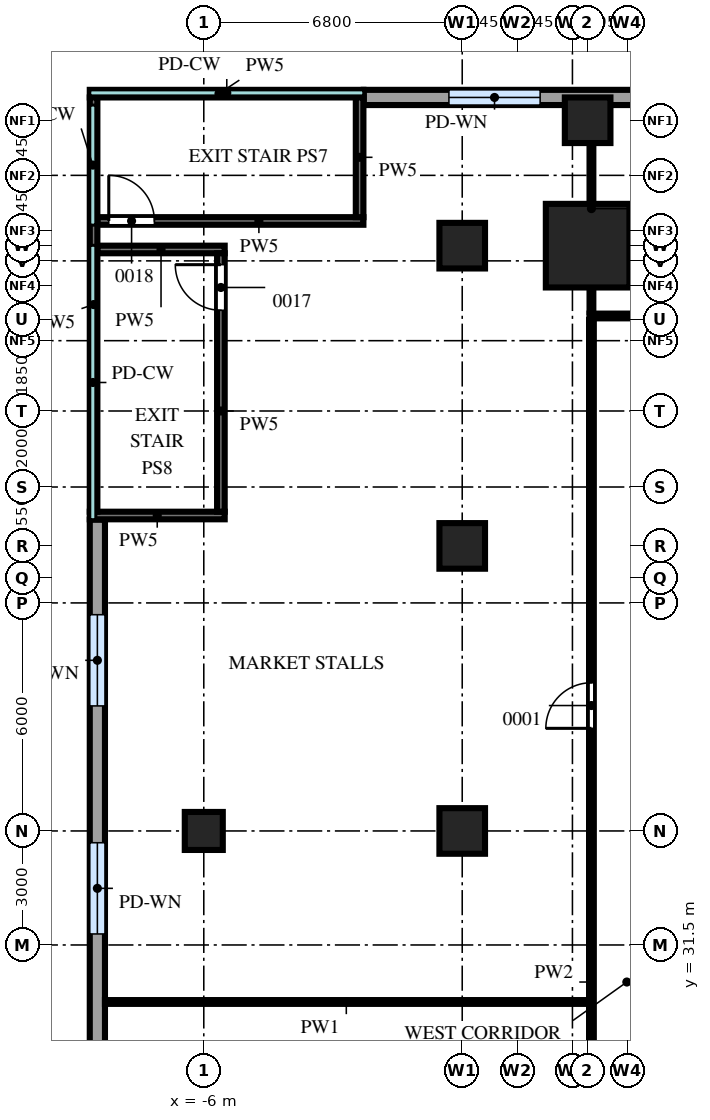
"""IFC4 building model, lengths in metres.
Left out: names, types, materials, properties, quantities, classifications, styles, units other than length and angle.
Written with IfcOpenShell. Run it as: python <this file> out.ifc"""

import sys

from ifc_helpers import new_model, si_unit, direction, frame, frame_2d, origin, origin_2d, place, context, subcontext, project, spatial, rectangle, extrude, source, transform, mapped, element, fill, save


model = new_model("IFC4")
c1 = context("Model", 3, precision=1e-05, world=origin(), true_north=direction((0.0, 1.0)))
c2 = subcontext(c1, "Body", "Model", "MODEL_VIEW")
j1 = project(units=[si_unit("LENGTHUNIT", "METRE"), si_unit("PLANEANGLEUNIT", "RADIAN")], contexts=[c1])
p1 = place(None, origin())
s1 = spatial("IfcSite", under=j1, at=p1, CompositionType="ELEMENT")
p2 = place(p1, origin())
s2 = spatial("IfcBuilding", under=s1, at=p2, CompositionType="ELEMENT")
p3 = place(p2, frame((0.0, 0.0, 7.5)))
s3 = spatial("IfcBuildingStorey", under=s2, at=p3, CompositionType="ELEMENT", Elevation=7.5)
m1 = source(origin(), c2, "Body", "SweptSolid", [
    extrude(rectangle(XDim=2.2, YDim=2.2, at=origin_2d()), origin(), (0.0, 0.0, 1.0), 5.2),
])
p4 = place(p3, frame((4.1, 49.9, 0.0), z_axis=(0.0, 0.0, 1.0), x_axis=(1.0, 0.0, 0.0)))
e1 = element("IfcColumn", 1, at=p4, inside=s3, PredefinedType="COLUMN", context=c2, shape_type="MappedRepresentation", body=[
    mapped(m1, transform((0.0, 0.0, 0.0))),
])
m2 = source(origin(), c2, "Body", "SweptSolid", [
    extrude(rectangle(XDim=1.2, YDim=1.2, at=origin_2d()), origin(), (0.0, 0.0, 1.0), 5.2),
])
for number, where, z_axis, x_axis in (
    (2, (4.1, 53.2, 0.0), (0.0, 0.0, 1.0), (1.0, 0.0, 0.0)),
    (3, (0.8, 34.5, 0.0), (0.0, 0.0, 1.0), (1.0, 0.0, 0.0)),
    (4, (0.8, 42.0, 0.0), (0.0, 0.0, 1.0), (1.0, 0.0, 0.0)),
    (5, (0.8, 49.9, 0.0), (0.0, 0.0, 1.0), (1.0, 0.0, 0.0)),
):
    element("IfcColumn", number, at=place(p3, frame(where, z_axis=z_axis, x_axis=x_axis)), inside=s3, PredefinedType="COLUMN", context=c2, shape_type="MappedRepresentation", body=[
        mapped(m2, transform((0.0, 0.0, 0.0))),
    ])
m3 = source(origin(), c2, "Body", "SweptSolid", [
    extrude(rectangle(XDim=1.0, YDim=1.0, at=origin_2d()), origin(), (0.0, 0.0, 1.0), 5.2),
])
p5 = place(p3, frame((-6.0, 34.5, 0.0), z_axis=(0.0, 0.0, 1.0), x_axis=(1.0, 0.0, 0.0)))
e6 = element("IfcColumn", 6, at=p5, inside=s3, PredefinedType="COLUMN", context=c2, shape_type="MappedRepresentation", body=[
    mapped(m3, transform((0.0, 0.0, 0.0))),
])
m4 = source(origin(), c2, "Body", "SweptSolid", [
    extrude(rectangle(XDim=31.38, YDim=0.4, at=frame_2d((15.69, 0.0))), origin(), (0.0, 0.0, 1.0), 5.2),
])
p6 = place(p3, frame((-8.8, 42.69, 0.0), z_axis=(0.0, 0.0, 1.0), x_axis=(0.0, -1.0, 0.0)))
e7 = element("IfcWall", 7, at=p6, inside=s3, PredefinedType="SOLIDWALL", context=c2, shape_type="MappedRepresentation", body=[
    mapped(m4, transform((0.0, 0.0, 0.0))),
])
m5 = source(origin(), c2, "Body", "SweptSolid", [
    extrude(rectangle(XDim=2.4, YDim=2.4, at=frame_2d((1.2, 1.2))), frame((0.0, 0.21, 0.0), z_axis=(0.0, -1.0, 0.0), x_axis=(1.0, 0.0, 0.0)), (0.0, 0.0, 1.0), 0.42),
])
p7 = place(p6, frame((2.5, 0.0, 1.0)))
e8 = element("IfcOpeningElement", 8, at=p7, cuts=e7, PredefinedType="OPENING", context=c2, shape_type="MappedRepresentation", body=[
    mapped(m5, transform((0.0, 0.0, 0.0))),
])
p8 = place(p6, frame((8.5, 0.0, 1.0)))
e9 = element("IfcOpeningElement", 9, at=p8, cuts=e7, PredefinedType="OPENING", context=c2, shape_type="MappedRepresentation", body=[
    mapped(m5, transform((0.0, 0.0, 0.0))),
])
p9 = place(p6, frame((14.5, 0.0, 1.0)))
e10 = element("IfcOpeningElement", 10, at=p9, cuts=e7, PredefinedType="OPENING", context=c2, shape_type="MappedRepresentation", body=[
    mapped(m5, transform((0.0, 0.0, 0.0))),
])
p10 = place(p6, frame((20.5, 0.0, 1.0)))
e11 = element("IfcOpeningElement", 11, at=p10, cuts=e7, PredefinedType="OPENING", context=c2, shape_type="MappedRepresentation", body=[
    mapped(m5, transform((0.0, 0.0, 0.0))),
])
p11 = place(p6, frame((26.5, 0.0, 1.0)))
e12 = element("IfcOpeningElement", 12, at=p11, cuts=e7, PredefinedType="OPENING", context=c2, shape_type="MappedRepresentation", body=[
    mapped(m5, transform((0.0, 0.0, 0.0))),
])
m6 = source(origin(), c2, "Body", "SweptSolid", [
    extrude(rectangle(XDim=30.84, YDim=0.4, at=frame_2d((15.42, 0.0))), origin(), (0.0, 0.0, 1.0), 5.2),
])
p12 = place(p3, frame((29.05, 53.8, 0.0), z_axis=(0.0, 0.0, 1.0), x_axis=(-1.0, 0.0, 0.0)))
e13 = element("IfcWall", 13, at=p12, inside=s3, PredefinedType="SOLIDWALL", context=c2, shape_type="MappedRepresentation", body=[
    mapped(m6, transform((0.0, 0.0, 0.0))),
])
p13 = place(p12, frame((20.2, 0.0, 1.0)))
e14 = element("IfcOpeningElement", 14, at=p13, cuts=e13, PredefinedType="OPENING", context=c2, shape_type="MappedRepresentation", body=[
    mapped(m5, transform((0.0, 0.0, 0.0))),
])
p14 = place(p12, frame((26.2, 0.0, 1.0)))
e15 = element("IfcOpeningElement", 15, at=p14, cuts=e13, PredefinedType="OPENING", context=c2, shape_type="MappedRepresentation", body=[
    mapped(m5, transform((0.0, 0.0, 0.0))),
])
m7 = source(origin(), c2, "Body", "SweptSolid", [
    extrude(rectangle(XDim=7.0, YDim=0.2, at=frame_2d((3.5, 0.0))), origin(), (0.0, 0.0, 1.0), 5.2),
])
p15 = place(p3, frame((-8.8, 50.55, 0.0), z_axis=(0.0, 0.0, 1.0), x_axis=(1.0, 0.0, 0.0)))
e16 = element("IfcWall", 16, at=p15, inside=s3, PredefinedType="PARTITIONING", context=c2, shape_type="MappedRepresentation", body=[
    mapped(m7, transform((0.0, 0.0, 0.0))),
])
m8 = source(origin(), c2, "Body", "SweptSolid", [
    extrude(rectangle(XDim=1.2, YDim=2.1, at=frame_2d((0.6, 1.05))), frame((0.0, 0.11, 0.0), z_axis=(0.0, -1.0, 0.0), x_axis=(1.0, 0.0, 0.0)), (0.0, 0.0, 1.0), 0.22),
])
p16 = place(p15, frame((0.3, 0.0, 0.0)))
e17 = element("IfcOpeningElement", 17, at=p16, cuts=e16, PredefinedType="OPENING", context=c2, shape_type="MappedRepresentation", body=[
    mapped(m8, transform((0.0, 0.0, 0.0))),
])
m9 = source(origin(), c2, "Body", "SweptSolid", [
    extrude(rectangle(XDim=7.2, YDim=0.2, at=frame_2d((3.6, 0.0))), origin(), (0.0, 0.0, 1.0), 5.2),
])
p17 = place(p3, frame((-9.0, 53.9, 0.0), z_axis=(0.0, 0.0, 1.0), x_axis=(1.0, 0.0, 0.0)))
e18 = element("IfcWall", 18, at=p17, inside=s3, PredefinedType="PARTITIONING", context=c2, shape_type="MappedRepresentation", body=[
    mapped(m9, transform((0.0, 0.0, 0.0))),
])
m10 = source(origin(), c2, "Body", "SweptSolid", [
    extrude(rectangle(XDim=3.15, YDim=0.2, at=frame_2d((1.575, 0.0))), origin(), (0.0, 0.0, 1.0), 5.2),
])
p18 = place(p3, frame((-1.9, 50.65, 0.0), z_axis=(0.0, 0.0, 1.0), x_axis=(0.0, 1.0, 0.0)))
e19 = element("IfcWall", 19, at=p18, inside=s3, PredefinedType="PARTITIONING", context=c2, shape_type="MappedRepresentation", body=[
    mapped(m10, transform((0.0, 0.0, 0.0))),
])
m11 = source(origin(), c2, "Body", "SweptSolid", [
    extrude(rectangle(XDim=3.55, YDim=0.2, at=frame_2d((1.775, 0.0))), origin(), (0.0, 0.0, 1.0), 5.2),
])
p19 = place(p3, frame((-9.0, 42.8, 0.0), z_axis=(0.0, 0.0, 1.0), x_axis=(1.0, 0.0, 0.0)))
e20 = element("IfcWall", 20, at=p19, inside=s3, PredefinedType="PARTITIONING", context=c2, shape_type="MappedRepresentation", body=[
    mapped(m11, transform((0.0, 0.0, 0.0))),
])
m12 = source(origin(), c2, "Body", "SweptSolid", [
    extrude(rectangle(XDim=3.35, YDim=0.2, at=frame_2d((1.675, 0.0))), origin(), (0.0, 0.0, 1.0), 5.2),
])
p20 = place(p3, frame((-8.8, 49.8, 0.0), z_axis=(0.0, 0.0, 1.0), x_axis=(1.0, 0.0, 0.0)))
e21 = element("IfcWall", 21, at=p20, inside=s3, PredefinedType="PARTITIONING", context=c2, shape_type="MappedRepresentation", body=[
    mapped(m12, transform((0.0, 0.0, 0.0))),
])
m13 = source(origin(), c2, "Body", "SweptSolid", [
    extrude(rectangle(XDim=10.9, YDim=0.2, at=frame_2d((5.45, 0.0))), origin(), (0.0, 0.0, 1.0), 5.2),
])
p21 = place(p3, frame((-8.9, 42.9, 0.0), z_axis=(0.0, 0.0, 1.0), x_axis=(0.0, 1.0, 0.0)))
e22 = element("IfcWall", 22, at=p21, inside=s3, PredefinedType="PARTITIONING", context=c2, shape_type="MappedRepresentation", body=[
    mapped(m13, transform((0.0, 0.0, 0.0))),
])
m14 = source(origin(), c2, "Body", "SweptSolid", [
    extrude(rectangle(XDim=6.8, YDim=0.2, at=frame_2d((3.4, 0.0))), origin(), (0.0, 0.0, 1.0), 5.2),
])
p22 = place(p3, frame((-5.55, 42.9, 0.0), z_axis=(0.0, 0.0, 1.0), x_axis=(0.0, 1.0, 0.0)))
e23 = element("IfcWall", 23, at=p22, inside=s3, PredefinedType="PARTITIONING", context=c2, shape_type="MappedRepresentation", body=[
    mapped(m14, transform((0.0, 0.0, 0.0))),
])
p23 = place(p22, frame((5.3, 0.0, 0.0)))
e24 = element("IfcOpeningElement", 24, at=p23, cuts=e23, PredefinedType="OPENING", context=c2, shape_type="MappedRepresentation", body=[
    mapped(m8, transform((0.0, 0.0, 0.0))),
])
m15 = source(origin(), c2, "Body", "SweptSolid", [
    extrude(rectangle(XDim=41.8, YDim=0.125, at=frame_2d((20.9, 0.0))), origin(), (0.0, 0.0, 1.0), 5.2),
])
p24 = place(p3, frame((4.2, 6.15, 0.0), z_axis=(0.0, 0.0, 1.0), x_axis=(0.0, 1.0, 0.0)))
e25 = element("IfcWall", 25, at=p24, inside=s3, PredefinedType="PARTITIONING", context=c2, shape_type="MappedRepresentation", body=[
    mapped(m15, transform((0.0, 0.0, 0.0))),
])
m16 = source(origin(), c2, "Body", "SweptSolid", [
    extrude(rectangle(XDim=1.2, YDim=2.1, at=frame_2d((0.6, 1.05))), frame((0.0, 0.073, 0.0), z_axis=(0.0, -1.0, 0.0), x_axis=(1.0, 0.0, 0.0)), (0.0, 0.0, 1.0), 0.145),
])
p25 = place(p24, frame((5.65, 0.0, 0.0)))
e26 = element("IfcOpeningElement", 26, at=p25, cuts=e25, PredefinedType="OPENING", context=c2, shape_type="MappedRepresentation", body=[
    mapped(m16, transform((0.0, 0.0, 0.0))),
])
p26 = place(p24, frame((16.5, 0.0, 0.0)))
e27 = element("IfcOpeningElement", 27, at=p26, cuts=e25, PredefinedType="OPENING", context=c2, shape_type="MappedRepresentation", body=[
    mapped(m16, transform((0.0, 0.0, 0.0))),
])
p27 = place(p24, frame((31.05, 0.0, 0.0)))
e28 = element("IfcOpeningElement", 28, at=p27, cuts=e25, PredefinedType="OPENING", context=c2, shape_type="MappedRepresentation", body=[
    mapped(m16, transform((0.0, 0.0, 0.0))),
])
m17 = source(origin(), c2, "Body", "SweptSolid", [
    extrude(rectangle(XDim=12.7, YDim=0.1, at=frame_2d((6.35, 0.0))), origin(), (0.0, 0.0, 1.0), 5.2),
])
p28 = place(p3, frame((-8.6, 30.0, 0.0), z_axis=(0.0, 0.0, 1.0), x_axis=(1.0, 0.0, 0.0)))
e29 = element("IfcWall", 29, at=p28, inside=s3, PredefinedType="PARTITIONING", context=c2, shape_type="MappedRepresentation", body=[
    mapped(m17, transform((0.0, 0.0, 0.0))),
])
m18 = source(origin(), c2, "Body", "SweptSolid", [
    extrude(rectangle(XDim=24.9, YDim=0.125, at=frame_2d((12.45, 0.0))), origin(), (0.0, 0.0, 1.0), 5.2),
])
p29 = place(p3, frame((4.15, 48.05, 0.0), z_axis=(0.0, 0.0, 1.0), x_axis=(1.0, 0.0, 0.0)))
e30 = element("IfcWall", 30, at=p29, inside=s3, PredefinedType="PARTITIONING", context=c2, shape_type="MappedRepresentation", body=[
    mapped(m18, transform((0.0, 0.0, 0.0))),
])
m19 = source(origin(), c2, "Body", "SweptSolid", [
    extrude(rectangle(XDim=0.9, YDim=2.1, at=frame_2d((0.45, 1.05))), frame((0.0, 0.073, 0.0), z_axis=(0.0, -1.0, 0.0), x_axis=(1.0, 0.0, 0.0)), (0.0, 0.0, 1.0), 0.145),
])
p30 = place(p29, frame((3.5, 0.0, 0.0)))
e31 = element("IfcOpeningElement", 31, at=p30, cuts=e30, PredefinedType="OPENING", context=c2, shape_type="MappedRepresentation", body=[
    mapped(m19, transform((0.0, 0.0, 0.0))),
])
m20 = source(origin(), c2, "Body", "SweptSolid", [
    extrude(rectangle(XDim=1.0, YDim=2.1, at=frame_2d((0.5, 1.05))), frame((0.0, 0.073, 0.0), z_axis=(0.0, -1.0, 0.0), x_axis=(1.0, 0.0, 0.0)), (0.0, 0.0, 1.0), 0.145),
])
p31 = place(p29, frame((9.6, 0.0, 0.0)))
e32 = element("IfcOpeningElement", 32, at=p31, cuts=e30, PredefinedType="OPENING", context=c2, shape_type="MappedRepresentation", body=[
    mapped(m20, transform((0.0, 0.0, 0.0))),
])
p32 = place(p29, frame((18.25, 0.0, 0.0)))
e33 = element("IfcOpeningElement", 33, at=p32, cuts=e30, PredefinedType="OPENING", context=c2, shape_type="MappedRepresentation", body=[
    mapped(m19, transform((0.0, 0.0, 0.0))),
])
m21 = source(origin(), c2, "Body", "SweptSolid", [
    extrude(rectangle(XDim=5.45, YDim=0.1, at=frame_2d((2.725, 0.0))), origin(), (0.0, 0.0, 1.0), 5.2),
])
p33 = place(p3, frame((4.2, 48.15, 0.0), z_axis=(0.0, 0.0, 1.0), x_axis=(0.0, 1.0, 0.0)))
e34 = element("IfcWall", 34, at=p33, inside=s3, PredefinedType="PARTITIONING", context=c2, shape_type="MappedRepresentation", body=[
    mapped(m21, transform((0.0, 0.0, 0.0))),
])
m22 = source(origin(), c2, "Body", "SweptSolid", [
    extrude(rectangle(XDim=2.4, YDim=2.4, at=frame_2d((1.2, 1.2))), frame((0.0, 0.03, 0.0), z_axis=(0.0, -1.0, 0.0), x_axis=(1.0, 0.0, 0.0)), (0.0, 0.0, 1.0), 0.06),
])
p34 = place(p7, origin())
e35 = element("IfcWindow", 35, at=p34, inside=s3, PartitioningType="SINGLE_PANEL", PredefinedType="WINDOW", context=c2, shape_type="MappedRepresentation", body=[
    mapped(m22, transform((0.0, 0.0, 0.0))),
])
fill(e8, e35)
p35 = place(p8, origin())
e36 = element("IfcWindow", 36, at=p35, inside=s3, PartitioningType="SINGLE_PANEL", PredefinedType="WINDOW", context=c2, shape_type="MappedRepresentation", body=[
    mapped(m22, transform((0.0, 0.0, 0.0))),
])
fill(e9, e36)
p36 = place(p14, origin())
e37 = element("IfcWindow", 37, at=p36, inside=s3, PartitioningType="SINGLE_PANEL", PredefinedType="WINDOW", context=c2, shape_type="MappedRepresentation", body=[
    mapped(m22, transform((0.0, 0.0, 0.0))),
])
fill(e15, e37)
m23 = source(origin(), c2, "Body", "SweptSolid", [
    extrude(rectangle(XDim=1.2, YDim=2.1, at=frame_2d((0.6, 1.05))), frame((0.0, 0.025, 0.0), z_axis=(0.0, -1.0, 0.0), x_axis=(1.0, 0.0, 0.0)), (0.0, 0.0, 1.0), 0.05),
])
p37 = place(p27, origin())
e38 = element("IfcDoor", 38, at=p37, inside=s3, OperationType="SINGLE_SWING_RIGHT", PredefinedType="DOOR", context=c2, shape_type="MappedRepresentation", body=[
    mapped(m23, transform((0.0, 0.0, 0.0))),
])
fill(e28, e38)
p38 = place(p16, origin())
e39 = element("IfcDoor", 39, at=p38, inside=s3, OperationType="SINGLE_SWING_RIGHT", PredefinedType="DOOR", context=c2, shape_type="MappedRepresentation", body=[
    mapped(m23, transform((0.0, 0.0, 0.0))),
])
fill(e17, e39)
p39 = place(p23, origin())
e40 = element("IfcDoor", 40, at=p39, inside=s3, OperationType="SINGLE_SWING_LEFT", PredefinedType="DOOR", context=c2, shape_type="MappedRepresentation", body=[
    mapped(m23, transform((0.0, 0.0, 0.0))),
])
fill(e24, e40)
save(model, sys.argv[1])
